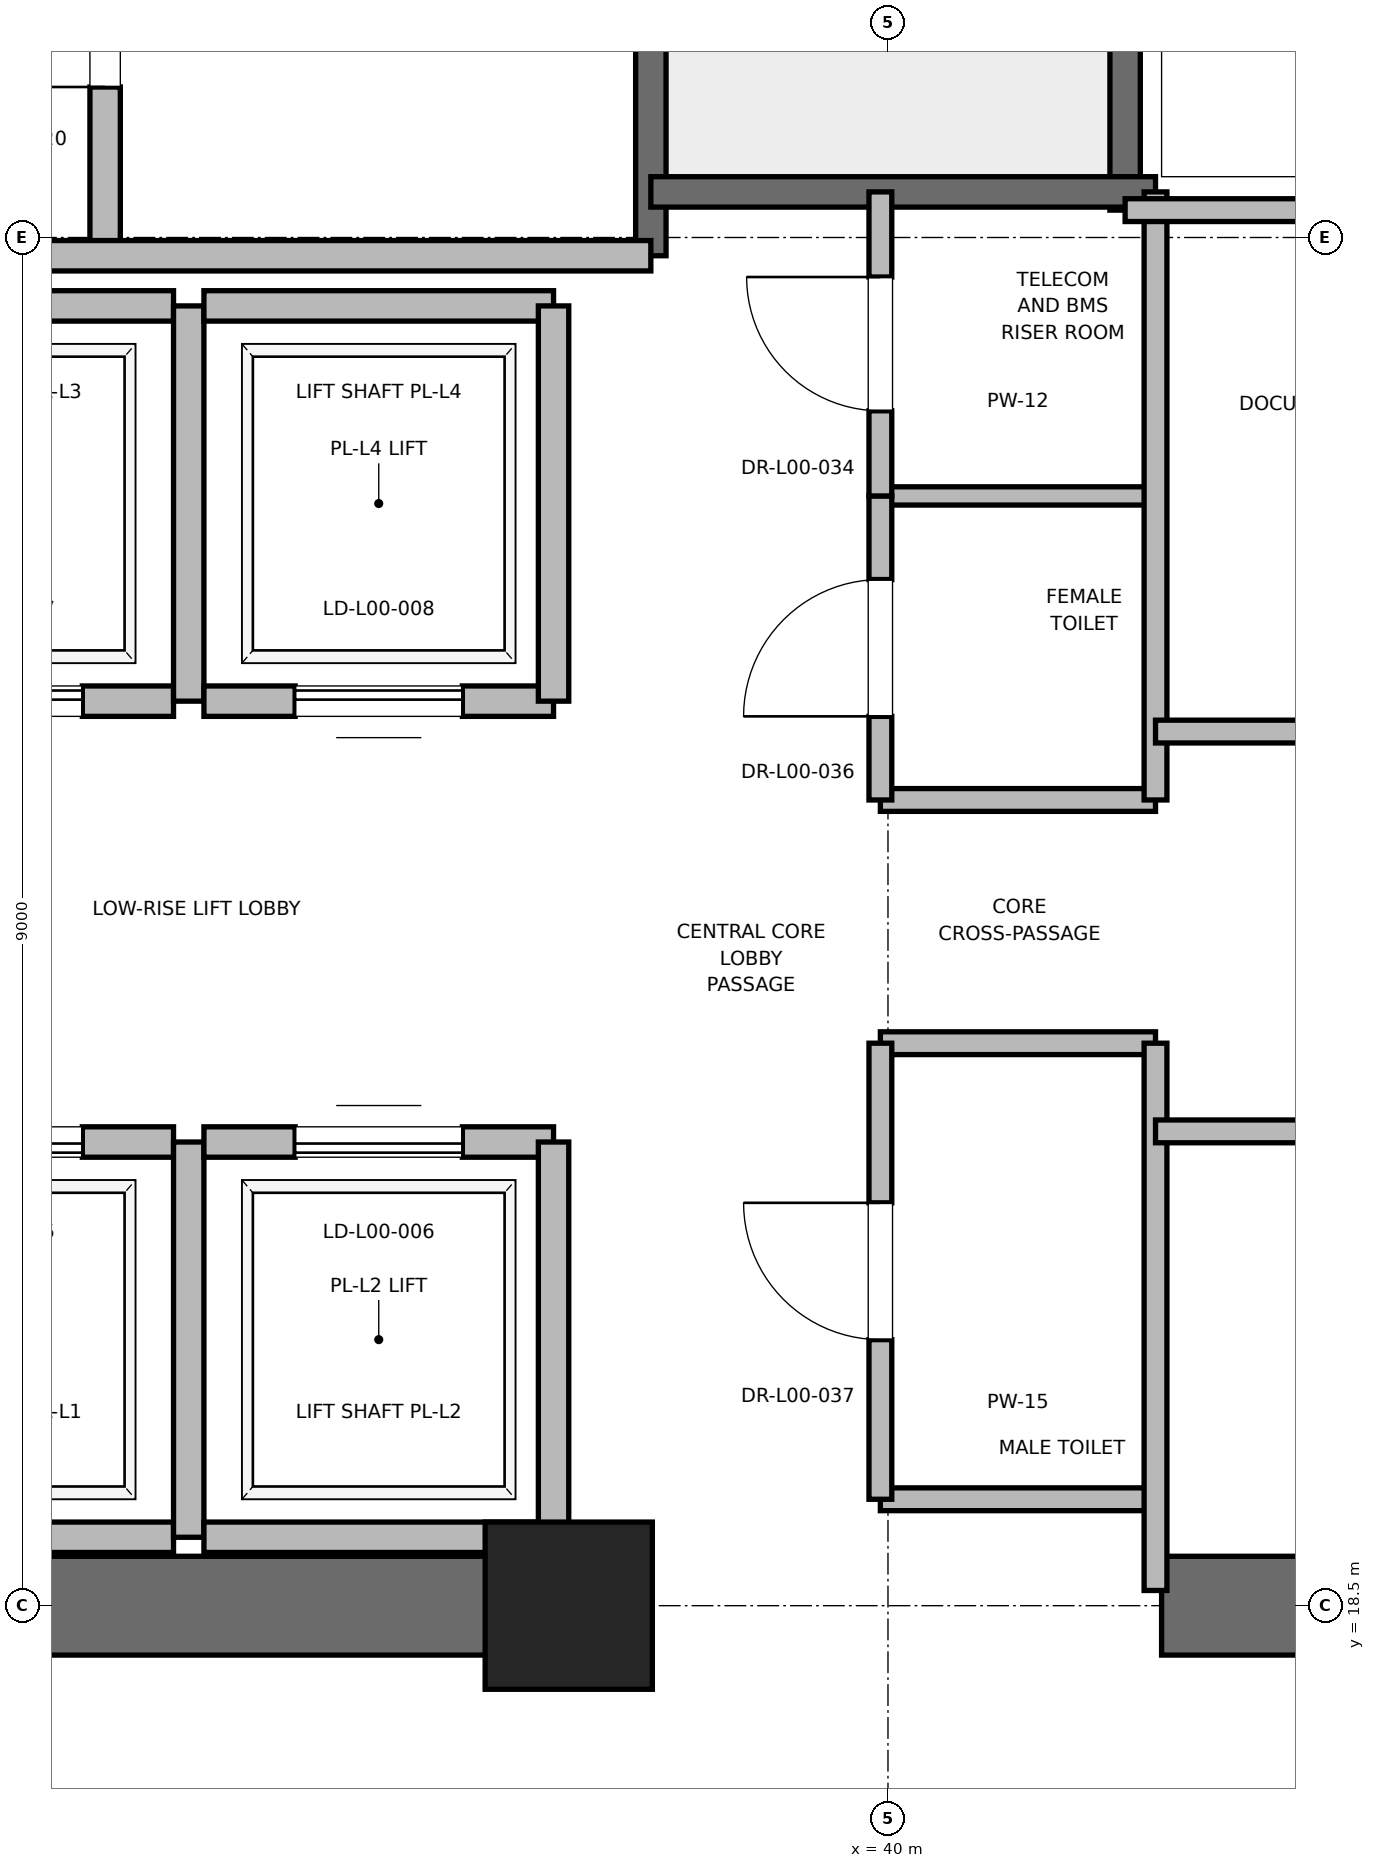
"""IFC4 building model, lengths in metres.
Left out: names, types, materials, properties, quantities, classifications, styles, units other than length and angle.
Written with IfcOpenShell. Run it as: python <this file> out.ifc"""

import sys

from ifc_helpers import new_model, si_unit, direction, frame, frame_2d, origin, origin_2d, place, context, subcontext, project, spatial, rectangle, extrude, element, fill, save


model = new_model("IFC4")
c1 = context("Model", 3, precision=1e-05, world=origin(), true_north=direction((0.0, 1.0)))
c2 = subcontext(c1, "Body", "Model", "MODEL_VIEW")
j1 = project(units=[si_unit("LENGTHUNIT", "METRE"), si_unit("PLANEANGLEUNIT", "RADIAN")], contexts=[c1])
p1 = place(None, origin())
s1 = spatial("IfcSite", under=j1, at=p1, CompositionType="ELEMENT")
p2 = place(p1, origin())
s2 = spatial("IfcBuilding", under=s1, at=p2, CompositionType="ELEMENT")
p3 = place(p2, origin())
s3 = spatial("IfcBuildingStorey", under=s2, at=p3, CompositionType="ELEMENT", Elevation=0.0)
p4 = place(p3, frame((37.9, 18.5, 0.0), z_axis=(0.0, 0.0, 1.0), x_axis=(1.0, 0.0, 0.0)))
e1 = element("IfcColumn", 1, at=p4, inside=s3, PredefinedType="PILASTER", context=c2, shape_type="SweptSolid", body=[
    extrude(rectangle(XDim=1.1, YDim=1.1, at=origin_2d()), origin(), (0.0, 0.0, 1.0), 6.0),
])
for number, where, z_axis, x_axis in (
    (2, (29.0, 18.5, 0.0), (0.0, 0.0, 1.0), (1.0, 0.0, 0.0)),
    (3, (41.8, 18.5, 0.0), (0.0, 0.0, 1.0), (1.0, 0.0, 0.0)),
):
    element("IfcWall", number, at=place(p3, frame(where, z_axis=z_axis, x_axis=x_axis)), inside=s3, PredefinedType="SHEAR", context=c2, shape_type="SweptSolid", body=[
        extrude(rectangle(XDim=9.2, YDim=0.65, at=frame_2d((4.6, 0.0))), origin(), (0.0, 0.0, 1.0), 5.72),
    ])
p5 = place(p3, frame((38.44, 27.38, 0.0), z_axis=(0.0, 0.0, 1.0), x_axis=(0.0, 1.0, 0.0)))
e4 = element("IfcWall", 4, at=p5, inside=s3, PredefinedType="SOLIDWALL", context=c2, shape_type="SweptSolid", body=[
    extrude(rectangle(XDim=8.87, YDim=0.2, at=frame_2d((4.435, 0.0))), origin(), (0.0, 0.0, 1.0), 5.72),
])
p6 = place(p3, frame((41.56, 27.68, 0.0), z_axis=(0.0, 0.0, 1.0), x_axis=(0.0, 1.0, 0.0)))
e5 = element("IfcWall", 5, at=p6, inside=s3, PredefinedType="SOLIDWALL", context=c2, shape_type="SweptSolid", body=[
    extrude(rectangle(XDim=8.57, YDim=0.2, at=frame_2d((4.285, 0.0))), origin(), (0.0, 0.0, 1.0), 5.72),
])
p7 = place(p3, frame((38.44, 27.8, 0.0), z_axis=(0.0, 0.0, 1.0), x_axis=(1.0, 0.0, 0.0)))
e6 = element("IfcWall", 6, at=p7, inside=s3, PredefinedType="SOLIDWALL", context=c2, shape_type="SweptSolid", body=[
    extrude(rectangle(XDim=3.32, YDim=0.2, at=frame_2d((1.66, 0.0))), origin(), (0.0, 0.0, 1.0), 5.72),
])
p8 = place(p3, frame((34.85, 27.38, 0.0), z_axis=(0.0, 0.0, 1.0), x_axis=(0.0, 1.0, 0.0)))
e7 = element("IfcWall", 7, at=p8, inside=s3, PredefinedType="PARTITIONING", context=c2, shape_type="SweptSolid", body=[
    extrude(rectangle(XDim=3.37, YDim=0.2, at=frame_2d((1.685, 0.0))), origin(), (0.0, 0.0, 1.0), 5.72),
])
p9 = place(p8, frame((1.11, 0.0, 0.0)))
e8 = element("IfcOpeningElement", 8, at=p9, cuts=e7, PredefinedType="OPENING", context=c2, shape_type="SweptSolid", body=[
    extrude(rectangle(XDim=1.15, YDim=2.2, at=frame_2d((0.575, 1.1))), frame((0.0, 0.1, 0.0), z_axis=(0.0, -1.0, 0.0), x_axis=(1.0, 0.0, 0.0)), (0.0, 0.0, 1.0), 0.2),
])
p10 = place(p3, frame((32.82, 27.38, 0.0), z_axis=(0.0, 0.0, 1.0), x_axis=(1.0, 0.0, 0.0)))
e9 = element("IfcWall", 9, at=p10, inside=s3, PredefinedType="PARTITIONING", context=c2, shape_type="SweptSolid", body=[
    extrude(rectangle(XDim=5.62, YDim=0.2, at=frame_2d((2.81, 0.0))), origin(), (0.0, 0.0, 1.0), 5.72),
])
p11 = place(p3, frame((33.0, 18.95, 0.0), z_axis=(0.0, 0.0, 1.0), x_axis=(1.0, 0.0, 0.0)))
e10 = element("IfcWall", 10, at=p11, inside=s3, PredefinedType="SOLIDWALL", context=c2, shape_type="SweptSolid", body=[
    extrude(rectangle(XDim=2.3, YDim=0.2, at=frame_2d((1.15, 0.0))), origin(), (0.0, 0.0, 1.0), 5.72),
])
p12 = place(p3, frame((35.3, 21.55, 0.0), z_axis=(0.0, 0.0, 1.0), x_axis=(-1.0, 0.0, 0.0)))
e11 = element("IfcWall", 11, at=p12, inside=s3, PredefinedType="SOLIDWALL", context=c2, shape_type="SweptSolid", body=[
    extrude(rectangle(XDim=2.3, YDim=0.2, at=frame_2d((1.15, 0.0))), origin(), (0.0, 0.0, 1.0), 5.72),
])
p13 = place(p12, frame((0.6, 0.0, 0.0)))
e12 = element("IfcOpeningElement", 12, at=p13, cuts=e11, PredefinedType="OPENING", context=c2, shape_type="SweptSolid", body=[
    extrude(rectangle(XDim=1.1, YDim=2.2, at=frame_2d((0.55, 1.1))), frame((0.0, 0.1, 0.0), z_axis=(0.0, -1.0, 0.0), x_axis=(1.0, 0.0, 0.0)), (0.0, 0.0, 1.0), 0.2),
])
p14 = place(p3, frame((35.4, 18.95, 0.0), z_axis=(0.0, 0.0, 1.0), x_axis=(0.0, 1.0, 0.0)))
e13 = element("IfcWall", 13, at=p14, inside=s3, PredefinedType="SOLIDWALL", context=c2, shape_type="SweptSolid", body=[
    extrude(rectangle(XDim=2.6, YDim=0.2, at=frame_2d((1.3, 0.0))), origin(), (0.0, 0.0, 1.0), 5.72),
])
p15 = place(p3, frame((35.5, 18.95, 0.0), z_axis=(0.0, 0.0, 1.0), x_axis=(1.0, 0.0, 0.0)))
e14 = element("IfcWall", 14, at=p15, inside=s3, PredefinedType="SOLIDWALL", context=c2, shape_type="SweptSolid", body=[
    extrude(rectangle(XDim=2.3, YDim=0.2, at=frame_2d((1.15, 0.0))), origin(), (0.0, 0.0, 1.0), 4.5),
])
p16 = place(p3, frame((37.8, 21.55, 0.0), z_axis=(0.0, 0.0, 1.0), x_axis=(-1.0, 0.0, 0.0)))
e15 = element("IfcWall", 15, at=p16, inside=s3, PredefinedType="SOLIDWALL", context=c2, shape_type="SweptSolid", body=[
    extrude(rectangle(XDim=2.3, YDim=0.2, at=frame_2d((1.15, 0.0))), origin(), (0.0, 0.0, 1.0), 5.72),
])
p17 = place(p16, frame((0.6, 0.0, 0.0)))
e16 = element("IfcOpeningElement", 16, at=p17, cuts=e15, PredefinedType="OPENING", context=c2, shape_type="SweptSolid", body=[
    extrude(rectangle(XDim=1.1, YDim=2.2, at=frame_2d((0.55, 1.1))), frame((0.0, 0.1, 0.0), z_axis=(0.0, -1.0, 0.0), x_axis=(1.0, 0.0, 0.0)), (0.0, 0.0, 1.0), 0.2),
])
p18 = place(p3, frame((37.8, 18.95, 0.0), z_axis=(0.0, 0.0, 1.0), x_axis=(0.0, 1.0, 0.0)))
e17 = element("IfcWall", 17, at=p18, inside=s3, PredefinedType="SOLIDWALL", context=c2, shape_type="SweptSolid", body=[
    extrude(rectangle(XDim=2.6, YDim=0.2, at=frame_2d((1.3, 0.0))), origin(), (0.0, 0.0, 1.0), 4.5),
])
p19 = place(p3, frame((33.0, 24.45, 0.0), z_axis=(0.0, 0.0, 1.0), x_axis=(1.0, 0.0, 0.0)))
e18 = element("IfcWall", 18, at=p19, inside=s3, PredefinedType="SOLIDWALL", context=c2, shape_type="SweptSolid", body=[
    extrude(rectangle(XDim=2.3, YDim=0.2, at=frame_2d((1.15, 0.0))), origin(), (0.0, 0.0, 1.0), 5.72),
])
p20 = place(p19, frame((0.6, 0.0, 0.0)))
e19 = element("IfcOpeningElement", 19, at=p20, cuts=e18, PredefinedType="OPENING", context=c2, shape_type="SweptSolid", body=[
    extrude(rectangle(XDim=1.1, YDim=2.2, at=frame_2d((0.55, 1.1))), frame((0.0, 0.1, 0.0), z_axis=(0.0, -1.0, 0.0), x_axis=(1.0, 0.0, 0.0)), (0.0, 0.0, 1.0), 0.2),
])
p21 = place(p3, frame((35.3, 27.05, 0.0), z_axis=(0.0, 0.0, 1.0), x_axis=(-1.0, 0.0, 0.0)))
e20 = element("IfcWall", 20, at=p21, inside=s3, PredefinedType="SOLIDWALL", context=c2, shape_type="SweptSolid", body=[
    extrude(rectangle(XDim=2.3, YDim=0.2, at=frame_2d((1.15, 0.0))), origin(), (0.0, 0.0, 1.0), 5.72),
])
p22 = place(p3, frame((35.4, 24.45, 0.0), z_axis=(0.0, 0.0, 1.0), x_axis=(0.0, 1.0, 0.0)))
e21 = element("IfcWall", 21, at=p22, inside=s3, PredefinedType="SOLIDWALL", context=c2, shape_type="SweptSolid", body=[
    extrude(rectangle(XDim=2.6, YDim=0.2, at=frame_2d((1.3, 0.0))), origin(), (0.0, 0.0, 1.0), 5.72),
])
p23 = place(p3, frame((35.5, 24.45, 0.0), z_axis=(0.0, 0.0, 1.0), x_axis=(1.0, 0.0, 0.0)))
e22 = element("IfcWall", 22, at=p23, inside=s3, PredefinedType="SOLIDWALL", context=c2, shape_type="SweptSolid", body=[
    extrude(rectangle(XDim=2.3, YDim=0.2, at=frame_2d((1.15, 0.0))), origin(), (0.0, 0.0, 1.0), 5.72),
])
p24 = place(p23, frame((0.6, 0.0, 0.0)))
e23 = element("IfcOpeningElement", 23, at=p24, cuts=e22, PredefinedType="OPENING", context=c2, shape_type="SweptSolid", body=[
    extrude(rectangle(XDim=1.1, YDim=2.2, at=frame_2d((0.55, 1.1))), frame((0.0, 0.1, 0.0), z_axis=(0.0, -1.0, 0.0), x_axis=(1.0, 0.0, 0.0)), (0.0, 0.0, 1.0), 0.2),
])
p25 = place(p3, frame((37.8, 27.05, 0.0), z_axis=(0.0, 0.0, 1.0), x_axis=(-1.0, 0.0, 0.0)))
e24 = element("IfcWall", 24, at=p25, inside=s3, PredefinedType="SOLIDWALL", context=c2, shape_type="SweptSolid", body=[
    extrude(rectangle(XDim=2.3, YDim=0.2, at=frame_2d((1.15, 0.0))), origin(), (0.0, 0.0, 1.0), 5.72),
])
p26 = place(p3, frame((37.8, 24.45, 0.0), z_axis=(0.0, 0.0, 1.0), x_axis=(0.0, 1.0, 0.0)))
e25 = element("IfcWall", 25, at=p26, inside=s3, PredefinedType="SOLIDWALL", context=c2, shape_type="SweptSolid", body=[
    extrude(rectangle(XDim=2.6, YDim=0.2, at=frame_2d((1.3, 0.0))), origin(), (0.0, 0.0, 1.0), 5.72),
])
for number, where, z_axis, x_axis in (
    (26, (39.95, 19.2, 0.0), (0.0, 0.0, 1.0), (1.0, 0.0, 0.0)),
    (27, (39.95, 22.2, 0.0), (0.0, 0.0, 1.0), (1.0, 0.0, 0.0)),
    (28, (39.95, 23.8, 0.0), (0.0, 0.0, 1.0), (1.0, 0.0, 0.0)),
):
    element("IfcWall", number, at=place(p3, frame(where, z_axis=z_axis, x_axis=x_axis)), inside=s3, PredefinedType="PARTITIONING", context=c2, shape_type="SweptSolid", body=[
        extrude(rectangle(XDim=1.81, YDim=0.15, at=frame_2d((0.905, 0.0))), origin(), (0.0, 0.0, 1.0), 2.85),
    ])
p27 = place(p3, frame((39.95, 25.8, 0.0), z_axis=(0.0, 0.0, 1.0), x_axis=(1.0, 0.0, 0.0)))
e29 = element("IfcWall", 29, at=p27, inside=s3, PredefinedType="PARTITIONING", context=c2, shape_type="SweptSolid", body=[
    extrude(rectangle(XDim=1.81, YDim=0.12, at=frame_2d((0.905, 0.0))), origin(), (0.0, 0.0, 1.0), 2.85),
])
p28 = place(p3, frame((41.76, 18.6, 0.0), z_axis=(0.0, 0.0, 1.0), x_axis=(0.0, 1.0, 0.0)))
e30 = element("IfcWall", 30, at=p28, inside=s3, PredefinedType="PARTITIONING", context=c2, shape_type="SweptSolid", body=[
    extrude(rectangle(XDim=3.6, YDim=0.15, at=frame_2d((1.8, 0.0))), origin(), (0.0, 0.0, 1.0), 2.85),
])
p29 = place(p3, frame((41.76, 23.8, 0.0), z_axis=(0.0, 0.0, 1.0), x_axis=(0.0, 1.0, 0.0)))
e31 = element("IfcWall", 31, at=p29, inside=s3, PredefinedType="PARTITIONING", context=c2, shape_type="SweptSolid", body=[
    extrude(rectangle(XDim=4.0, YDim=0.15, at=frame_2d((2.0, 0.0))), origin(), (0.0, 0.0, 1.0), 2.85),
])
p30 = place(p3, frame((39.95, 19.2, 0.0), z_axis=(0.0, 0.0, 1.0), x_axis=(0.0, 1.0, 0.0)))
e32 = element("IfcWall", 32, at=p30, inside=s3, PredefinedType="PARTITIONING", context=c2, shape_type="SweptSolid", body=[
    extrude(rectangle(XDim=3.0, YDim=0.15, at=frame_2d((1.5, 0.0))), origin(), (0.0, 0.0, 1.0), 2.85),
])
p31 = place(p30, frame((1.05, 0.0, 0.0)))
e33 = element("IfcOpeningElement", 33, at=p31, cuts=e32, PredefinedType="OPENING", context=c2, shape_type="SweptSolid", body=[
    extrude(rectangle(XDim=0.9, YDim=2.1, at=frame_2d((0.45, 1.05))), frame((0.0, 0.075, 0.0), z_axis=(0.0, -1.0, 0.0), x_axis=(1.0, 0.0, 0.0)), (0.0, 0.0, 1.0), 0.15),
])
p32 = place(p3, frame((39.95, 23.8, 0.0), z_axis=(0.0, 0.0, 1.0), x_axis=(0.0, 1.0, 0.0)))
e34 = element("IfcWall", 34, at=p32, inside=s3, PredefinedType="PARTITIONING", context=c2, shape_type="SweptSolid", body=[
    extrude(rectangle(XDim=2.0, YDim=0.15, at=frame_2d((1.0, 0.0))), origin(), (0.0, 0.0, 1.0), 2.85),
])
p33 = place(p32, frame((0.55, 0.0, 0.0)))
e35 = element("IfcOpeningElement", 35, at=p33, cuts=e34, PredefinedType="OPENING", context=c2, shape_type="SweptSolid", body=[
    extrude(rectangle(XDim=0.9, YDim=2.1, at=frame_2d((0.45, 1.05))), frame((0.0, 0.075, 0.0), z_axis=(0.0, -1.0, 0.0), x_axis=(1.0, 0.0, 0.0)), (0.0, 0.0, 1.0), 0.15),
])
p34 = place(p3, frame((39.95, 25.8, 0.0), z_axis=(0.0, 0.0, 1.0), x_axis=(0.0, 1.0, 0.0)))
e36 = element("IfcWall", 36, at=p34, inside=s3, PredefinedType="PARTITIONING", context=c2, shape_type="SweptSolid", body=[
    extrude(rectangle(XDim=2.0, YDim=0.15, at=frame_2d((1.0, 0.0))), origin(), (0.0, 0.0, 1.0), 2.85),
])
p35 = place(p34, frame((0.56, 0.0, 0.0)))
e37 = element("IfcOpeningElement", 37, at=p35, cuts=e36, PredefinedType="OPENING", context=c2, shape_type="SweptSolid", body=[
    extrude(rectangle(XDim=0.88, YDim=2.1, at=frame_2d((0.44, 1.05))), frame((0.0, 0.075, 0.0), z_axis=(0.0, -1.0, 0.0), x_axis=(1.0, 0.0, 0.0)), (0.0, 0.0, 1.0), 0.15),
])
p36 = place(p3, frame((41.56, 27.68, 0.0), z_axis=(0.0, 0.0, 1.0), x_axis=(1.0, 0.0, 0.0)))
e38 = element("IfcWall", 38, at=p36, inside=s3, PredefinedType="PARTITIONING", context=c2, shape_type="SweptSolid", body=[
    extrude(rectangle(XDim=3.59, YDim=0.15, at=frame_2d((1.795, 0.0))), origin(), (0.0, 0.0, 1.0), 2.85),
])
p37 = place(p3, frame((41.76, 21.62, 0.0), z_axis=(0.0, 0.0, 1.0), x_axis=(1.0, 0.0, 0.0)))
e39 = element("IfcWall", 39, at=p37, inside=s3, PredefinedType="PARTITIONING", context=c2, shape_type="SweptSolid", body=[
    extrude(rectangle(XDim=5.98, YDim=0.15, at=frame_2d((2.99, 0.0))), origin(), (0.0, 0.0, 1.0), 2.85),
])
p38 = place(p37, frame((2.49, 0.0, 0.0)))
e40 = element("IfcOpeningElement", 40, at=p38, cuts=e39, PredefinedType="OPENING", context=c2, shape_type="SweptSolid", body=[
    extrude(rectangle(XDim=1.0, YDim=2.15, at=frame_2d((0.5, 1.075))), frame((0.0, 0.075, 0.0), z_axis=(0.0, -1.0, 0.0), x_axis=(1.0, 0.0, 0.0)), (0.0, 0.0, 1.0), 0.15),
])
p39 = place(p3, frame((41.76, 24.25, 0.0), z_axis=(0.0, 0.0, 1.0), x_axis=(1.0, 0.0, 0.0)))
e41 = element("IfcWall", 41, at=p39, inside=s3, PredefinedType="PARTITIONING", context=c2, shape_type="SweptSolid", body=[
    extrude(rectangle(XDim=3.39, YDim=0.15, at=frame_2d((1.695, 0.0))), origin(), (0.0, 0.0, 1.0), 2.85),
])
p40 = place(p39, frame((1.195, 0.0, 0.0)))
e42 = element("IfcOpeningElement", 42, at=p40, cuts=e41, PredefinedType="OPENING", context=c2, shape_type="SweptSolid", body=[
    extrude(rectangle(XDim=1.0, YDim=2.15, at=frame_2d((0.5, 1.075))), frame((0.0, 0.075, 0.0), z_axis=(0.0, -1.0, 0.0), x_axis=(1.0, 0.0, 0.0)), (0.0, 0.0, 1.0), 0.15),
])
p41 = place(p9, origin())
e43 = element("IfcDoor", 43, at=p41, inside=s3, OperationType="SINGLE_SWING_LEFT", PredefinedType="DOOR", context=c2, shape_type="SweptSolid", body=[
    extrude(rectangle(XDim=1.15, YDim=2.2, at=frame_2d((0.575, 1.1))), frame((0.0, 0.025, 0.0), z_axis=(0.0, -1.0, 0.0), x_axis=(1.0, 0.0, 0.0)), (0.0, 0.0, 1.0), 0.05),
])
fill(e8, e43)
p42 = place(p13, origin())
e44 = element("IfcDoor", 44, at=p42, inside=s3, OperationType="SLIDING_TO_RIGHT", PredefinedType="DOOR", context=c2, shape_type="SweptSolid", body=[
    extrude(rectangle(XDim=1.1, YDim=2.2, at=frame_2d((0.55, 1.1))), frame((0.0, 0.025, 0.0), z_axis=(0.0, -1.0, 0.0), x_axis=(1.0, 0.0, 0.0)), (0.0, 0.0, 1.0), 0.05),
])
fill(e12, e44)
p43 = place(p17, origin())
e45 = element("IfcDoor", 45, at=p43, inside=s3, OperationType="SLIDING_TO_RIGHT", PredefinedType="DOOR", context=c2, shape_type="SweptSolid", body=[
    extrude(rectangle(XDim=1.1, YDim=2.2, at=frame_2d((0.55, 1.1))), frame((0.0, 0.025, 0.0), z_axis=(0.0, -1.0, 0.0), x_axis=(1.0, 0.0, 0.0)), (0.0, 0.0, 1.0), 0.05),
])
fill(e16, e45)
p44 = place(p20, origin())
e46 = element("IfcDoor", 46, at=p44, inside=s3, OperationType="SLIDING_TO_RIGHT", PredefinedType="DOOR", context=c2, shape_type="SweptSolid", body=[
    extrude(rectangle(XDim=1.1, YDim=2.2, at=frame_2d((0.55, 1.1))), frame((0.0, 0.025, 0.0), z_axis=(0.0, -1.0, 0.0), x_axis=(1.0, 0.0, 0.0)), (0.0, 0.0, 1.0), 0.05),
])
fill(e19, e46)
p45 = place(p24, origin())
e47 = element("IfcDoor", 47, at=p45, inside=s3, OperationType="SLIDING_TO_RIGHT", PredefinedType="DOOR", context=c2, shape_type="SweptSolid", body=[
    extrude(rectangle(XDim=1.1, YDim=2.2, at=frame_2d((0.55, 1.1))), frame((0.0, 0.025, 0.0), z_axis=(0.0, -1.0, 0.0), x_axis=(1.0, 0.0, 0.0)), (0.0, 0.0, 1.0), 0.05),
])
fill(e23, e47)
p46 = place(p31, origin())
e48 = element("IfcDoor", 48, at=p46, inside=s3, OperationType="SINGLE_SWING_RIGHT", PredefinedType="DOOR", context=c2, shape_type="SweptSolid", body=[
    extrude(rectangle(XDim=0.9, YDim=2.1, at=frame_2d((0.45, 1.05))), frame((0.0, 0.025, 0.0), z_axis=(0.0, -1.0, 0.0), x_axis=(1.0, 0.0, 0.0)), (0.0, 0.0, 1.0), 0.05),
])
fill(e33, e48)
p47 = place(p33, origin())
e49 = element("IfcDoor", 49, at=p47, inside=s3, OperationType="SINGLE_SWING_LEFT", PredefinedType="DOOR", context=c2, shape_type="SweptSolid", body=[
    extrude(rectangle(XDim=0.9, YDim=2.1, at=frame_2d((0.45, 1.05))), frame((0.0, 0.025, 0.0), z_axis=(0.0, -1.0, 0.0), x_axis=(1.0, 0.0, 0.0)), (0.0, 0.0, 1.0), 0.05),
])
fill(e35, e49)
p48 = place(p35, origin())
e50 = element("IfcDoor", 50, at=p48, inside=s3, OperationType="SINGLE_SWING_RIGHT", PredefinedType="DOOR", context=c2, shape_type="SweptSolid", body=[
    extrude(rectangle(XDim=0.88, YDim=2.1, at=frame_2d((0.44, 1.05))), frame((0.0, 0.025, 0.0), z_axis=(0.0, -1.0, 0.0), x_axis=(1.0, 0.0, 0.0)), (0.0, 0.0, 1.0), 0.05),
])
fill(e37, e50)
save(model, sys.argv[1])
